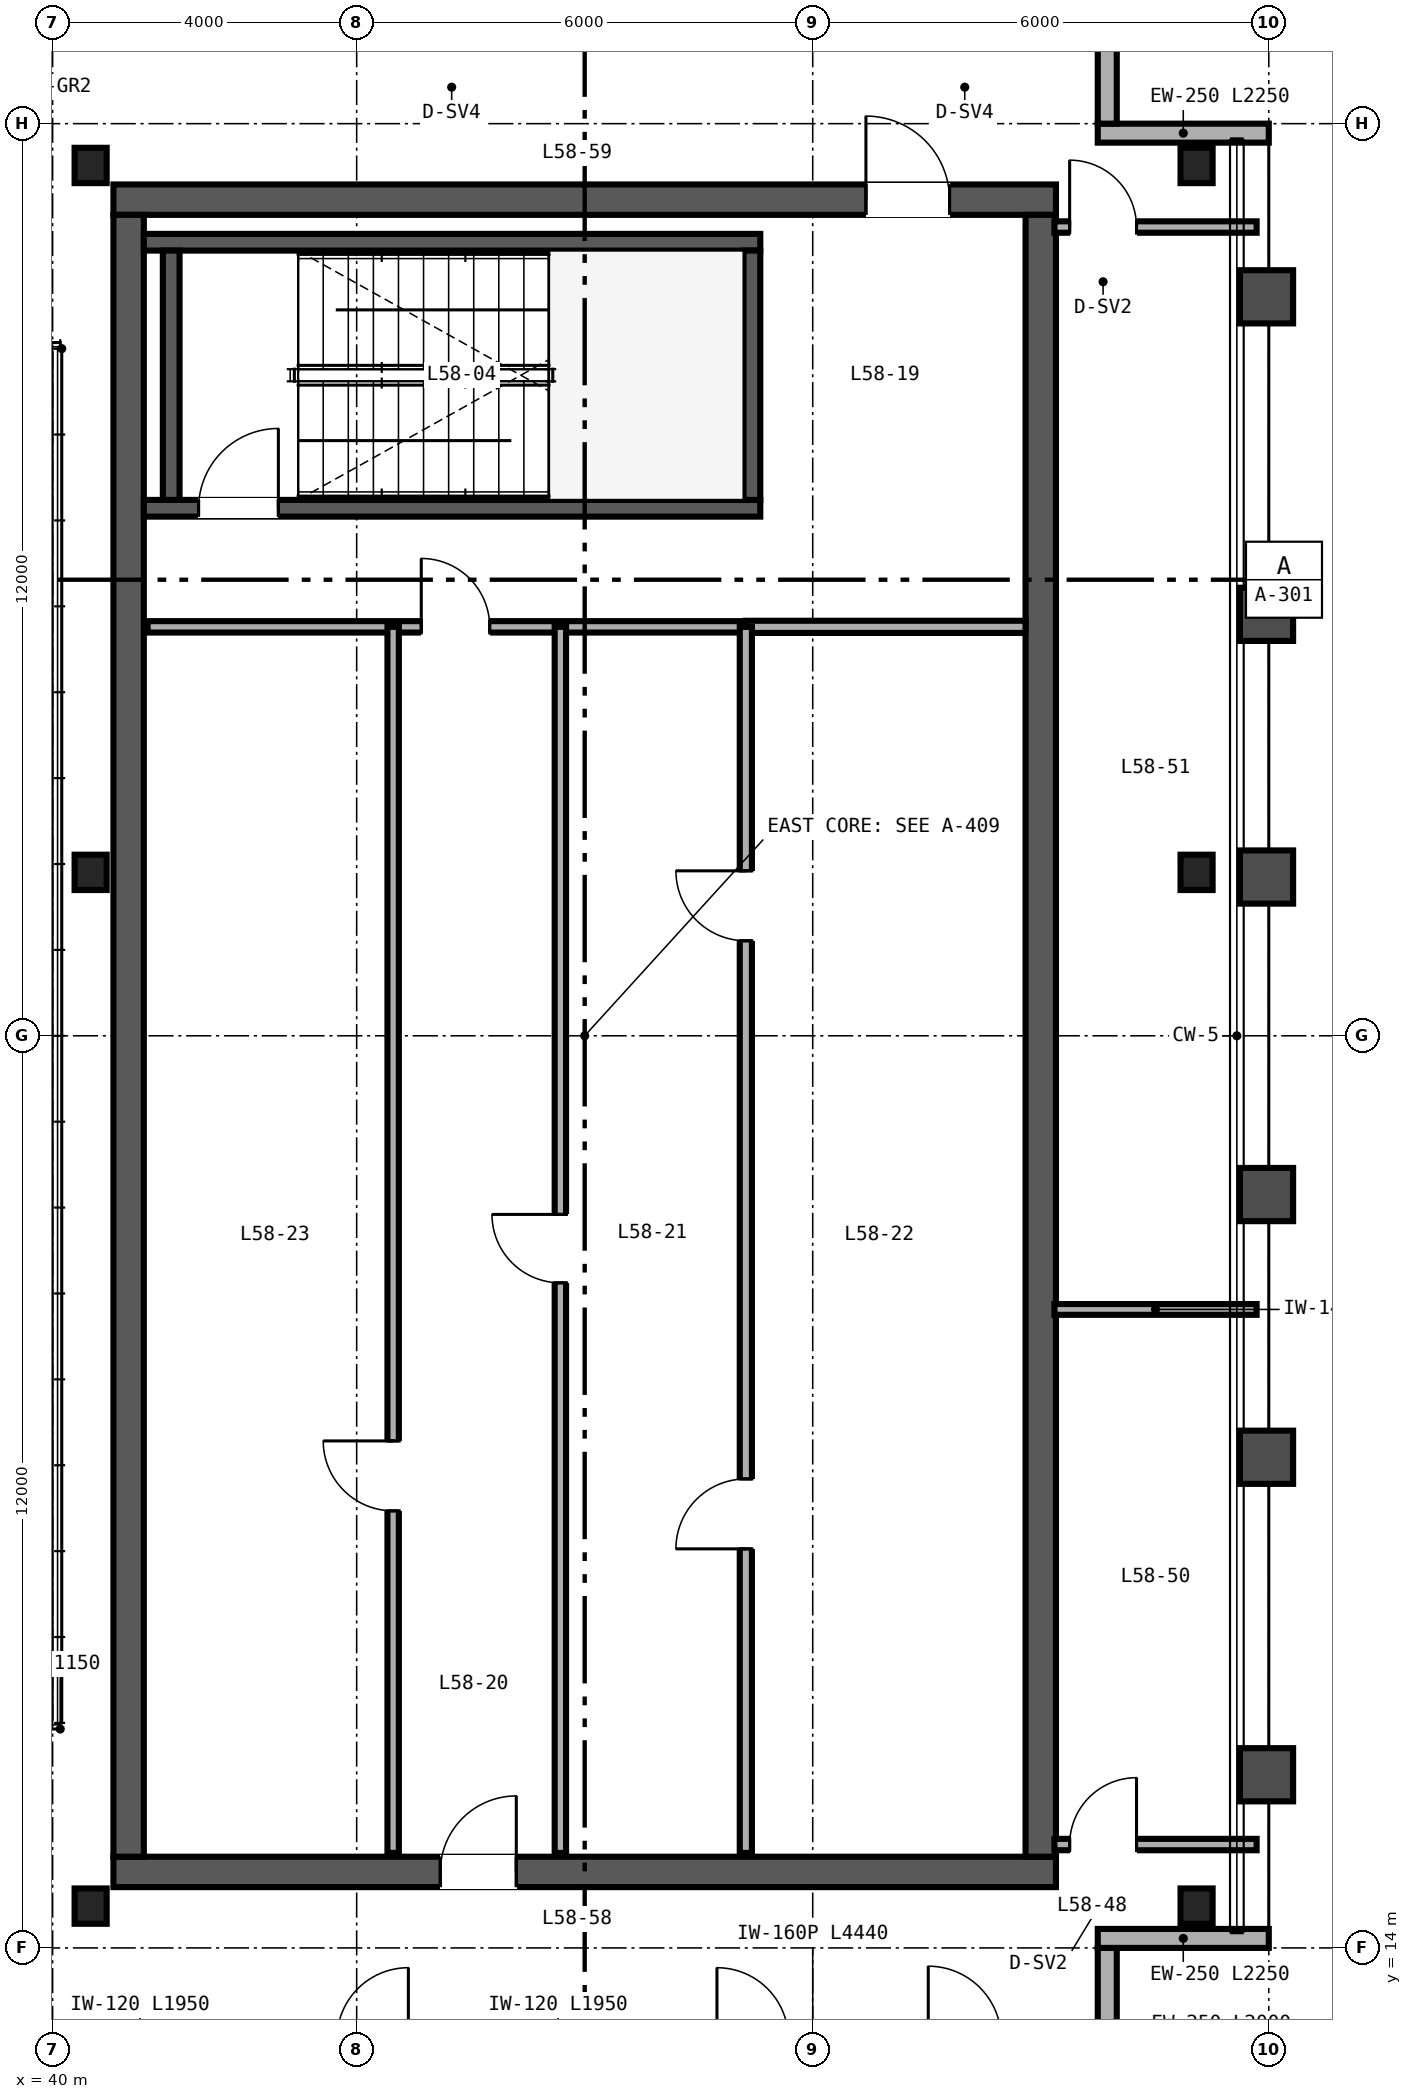
"""IFC4 building model, lengths in metres.
Left out: names, types, materials, properties, quantities, classifications, styles, units other than length and angle.
Written with IfcOpenShell. Run it as: python <this file> out.ifc"""

import sys

from ifc_helpers import new_model, si_unit, direction, frame, frame_2d, origin, origin_2d, place, context, subcontext, project, spatial, rectangle, i_section, extrude, source, transform, mapped, element, fill, save


model = new_model("IFC4")
c1 = context("Model", 3, precision=1e-05, world=origin(), true_north=direction((0.0, 1.0)))
c2 = subcontext(c1, "Body", "Model", "MODEL_VIEW")
j1 = project(units=[si_unit("LENGTHUNIT", "METRE"), si_unit("PLANEANGLEUNIT", "RADIAN")], contexts=[c1])
p1 = place(None, origin())
s1 = spatial("IfcSite", under=j1, at=p1, CompositionType="ELEMENT")
p2 = place(p1, origin())
s2 = spatial("IfcBuilding", under=s1, at=p2, CompositionType="ELEMENT")
p3 = place(p2, frame((0.0, 0.0, 232.8)))
s3 = spatial("IfcBuildingStorey", under=s2, at=p3, CompositionType="ELEMENT", Elevation=232.8)
p4 = place(p3, frame((40.8, 15.0, 0.0), z_axis=(0.0, 0.0, 1.0), x_axis=(1.0, 0.0, 0.0)))
e1 = element("IfcWall", 1, at=p4, inside=s3, PredefinedType="SHEAR", context=c2, shape_type="SweptSolid", body=[
    extrude(rectangle(XDim=12.4, YDim=0.4, at=frame_2d((6.2, 0.0))), origin(), (0.0, 0.0, 1.0), 3.38),
])
p5 = place(p4, frame((4.3, 0.0, 0.0)))
e2 = element("IfcOpeningElement", 2, at=p5, cuts=e1, PredefinedType="OPENING", context=c2, shape_type="SweptSolid", body=[
    extrude(rectangle(XDim=1.0, YDim=2.15, at=frame_2d((0.5, 1.075))), frame((0.0, 0.21, 0.0), z_axis=(0.0, -1.0, 0.0), x_axis=(1.0, 0.0, 0.0)), (0.0, 0.0, 1.0), 0.42),
])
p6 = place(p3, frame((40.8, 37.0, 0.0), z_axis=(0.0, 0.0, 1.0), x_axis=(1.0, 0.0, 0.0)))
e3 = element("IfcWall", 3, at=p6, inside=s3, PredefinedType="SHEAR", context=c2, shape_type="SweptSolid", body=[
    extrude(rectangle(XDim=12.4, YDim=0.4, at=frame_2d((6.2, 0.0))), origin(), (0.0, 0.0, 1.0), 3.38),
])
p7 = place(p6, frame((9.9, 0.0, 0.0)))
e4 = element("IfcOpeningElement", 4, at=p7, cuts=e3, PredefinedType="OPENING", context=c2, shape_type="SweptSolid", body=[
    extrude(rectangle(XDim=1.1, YDim=2.15, at=frame_2d((0.55, 1.075))), frame((0.0, 0.21, 0.0), z_axis=(0.0, -1.0, 0.0), x_axis=(1.0, 0.0, 0.0)), (0.0, 0.0, 1.0), 0.42),
])
for number, where, z_axis, x_axis in (
    (5, (41.0, 15.2, 0.0), (0.0, 0.0, 1.0), (0.0, 1.0, 0.0)),
    (6, (53.0, 15.2, 0.0), (0.0, 0.0, 1.0), (0.0, 1.0, 0.0)),
):
    element("IfcWall", number, at=place(p3, frame(where, z_axis=z_axis, x_axis=x_axis)), inside=s3, PredefinedType="SHEAR", context=c2, shape_type="SweptSolid", body=[
        extrude(rectangle(XDim=21.6, YDim=0.4, at=frame_2d((10.8, 0.0))), origin(), (0.0, 0.0, 1.0), 3.38),
    ])
p8 = place(p3, frame((41.2, 32.94, 0.0), z_axis=(0.0, 0.0, 1.0), x_axis=(1.0, 0.0, 0.0)))
e7 = element("IfcWall", 7, at=p8, inside=s3, PredefinedType="SHEAR", context=c2, shape_type="SweptSolid", body=[
    extrude(rectangle(XDim=8.11, YDim=0.22, at=frame_2d((4.055, 0.0))), origin(), (0.0, 0.0, 1.0), 3.4),
])
p9 = place(p8, frame((0.72, 0.0, 0.0)))
e8 = element("IfcOpeningElement", 8, at=p9, cuts=e7, PredefinedType="OPENING", context=c2, shape_type="SweptSolid", body=[
    extrude(rectangle(XDim=1.05, YDim=2.15, at=frame_2d((0.525, 1.075))), frame((0.0, 0.12, 0.0), z_axis=(0.0, -1.0, 0.0), x_axis=(1.0, 0.0, 0.0)), (0.0, 0.0, 1.0), 0.24),
])
p10 = place(p3, frame((41.2, 36.44, 0.0), z_axis=(0.0, 0.0, 1.0), x_axis=(1.0, 0.0, 0.0)))
e9 = element("IfcWall", 9, at=p10, inside=s3, PredefinedType="SHEAR", context=c2, shape_type="SweptSolid", body=[
    extrude(rectangle(XDim=8.11, YDim=0.22, at=frame_2d((4.055, 0.0))), origin(), (0.0, 0.0, 1.0), 3.4),
])
for number, where, z_axis, x_axis in (
    (10, (41.56, 33.05, 0.0), (0.0, 0.0, 1.0), (0.0, 1.0, 0.0)),
    (11, (49.2, 33.05, 0.0), (0.0, 0.0, 1.0), (0.0, 1.0, 0.0)),
):
    element("IfcWall", number, at=place(p3, frame(where, z_axis=z_axis, x_axis=x_axis)), inside=s3, PredefinedType="SHEAR", context=c2, shape_type="SweptSolid", body=[
        extrude(rectangle(XDim=3.28, YDim=0.22, at=frame_2d((1.64, 0.0))), origin(), (0.0, 0.0, 1.0), 3.4),
    ])
m1 = source(origin(), c2, "Body", "SweptSolid", [
    extrude(i_section(OverallWidth=0.422, OverallDepth=0.465, WebThickness=0.045, FlangeThickness=0.073, FilletRadius=0.025, at=origin_2d()), origin(), (0.0, 0.0, 1.0), 3.38),
])
for number, where, z_axis, x_axis in (
    (12, (40.5, 14.55, 0.0), (0.0, 0.0, 1.0), (1.0, 0.0, 0.0)),
    (13, (55.05, 14.55, 0.0), (0.0, 0.0, 1.0), (1.0, 0.0, 0.0)),
    (14, (40.5, 28.15, 0.0), (0.0, 0.0, 1.0), (1.0, 0.0, 0.0)),
    (15, (55.05, 28.15, 0.0), (0.0, 0.0, 1.0), (1.0, 0.0, 0.0)),
    (16, (40.5, 37.45, 0.0), (0.0, 0.0, 1.0), (1.0, 0.0, 0.0)),
    (17, (55.05, 37.45, 0.0), (0.0, 0.0, 1.0), (1.0, 0.0, 0.0)),
):
    element("IfcColumn", number, at=place(p3, frame(where, z_axis=z_axis, x_axis=x_axis)), inside=s3, PredefinedType="COLUMN", context=c2, shape_type="MappedRepresentation", body=[
        mapped(m1, transform((0.0, 0.0, 0.0), scale=1.0)),
    ])
p11 = place(p3, frame((53.875, 12.0, 0.0), z_axis=(0.0, 0.0, 1.0), x_axis=(0.0, 1.0, 0.0)))
e18 = element("IfcWall", 18, at=p11, inside=s3, PredefinedType="SOLIDWALL", context=c2, shape_type="SweptSolid", body=[
    extrude(rectangle(XDim=2.0, YDim=0.25, at=frame_2d((1.0, 0.0))), origin(), (0.0, 0.0, 1.0), 3.38),
])
for number, where, z_axis, x_axis in (
    (19, (53.75, 14.125, 0.0), (0.0, 0.0, 1.0), (1.0, 0.0, 0.0)),
    (20, (56.0, 37.875, 0.0), (0.0, 0.0, 1.0), (-1.0, 0.0, 0.0)),
):
    element("IfcWall", number, at=place(p3, frame(where, z_axis=z_axis, x_axis=x_axis)), inside=s3, PredefinedType="SOLIDWALL", context=c2, shape_type="SweptSolid", body=[
        extrude(rectangle(XDim=2.25, YDim=0.25, at=frame_2d((1.125, 0.0))), origin(), (0.0, 0.0, 1.0), 3.38),
    ])
p12 = place(p3, frame((53.875, 38.0, 0.0), z_axis=(0.0, 0.0, 1.0), x_axis=(0.0, 1.0, 0.0)))
e21 = element("IfcWall", 21, at=p12, inside=s3, PredefinedType="SOLIDWALL", context=c2, shape_type="SweptSolid", body=[
    extrude(rectangle(XDim=2.0, YDim=0.25, at=frame_2d((1.0, 0.0))), origin(), (0.0, 0.0, 1.0), 3.38),
])
p13 = place(p3, frame((41.25, 31.38, 0.0), z_axis=(0.0, 0.0, 1.0), x_axis=(1.0, 0.0, 0.0)))
e22 = element("IfcWall", 22, at=p13, inside=s3, PredefinedType="PARTITIONING", context=c2, shape_type="SweptSolid", body=[
    extrude(rectangle(XDim=7.87, YDim=0.15, at=frame_2d((3.935, 0.0))), origin(), (0.0, 0.0, 1.0), 2.48),
])
p14 = place(p13, frame((3.6, 0.0, 0.0)))
e23 = element("IfcOpeningElement", 23, at=p14, cuts=e22, PredefinedType="OPENING", context=c2, shape_type="SweptSolid", body=[
    extrude(rectangle(XDim=0.9, YDim=2.15, at=frame_2d((0.45, 1.075))), frame((0.0, 0.085, 0.0), z_axis=(0.0, -1.0, 0.0), x_axis=(1.0, 0.0, 0.0)), (0.0, 0.0, 1.0), 0.17),
])
p15 = place(p3, frame((46.68, 15.25, 0.0), z_axis=(0.0, 0.0, 1.0), x_axis=(0.0, 1.0, 0.0)))
e24 = element("IfcWall", 24, at=p15, inside=s3, PredefinedType="PARTITIONING", context=c2, shape_type="SweptSolid", body=[
    extrude(rectangle(XDim=16.13, YDim=0.15, at=frame_2d((8.065, 0.0))), origin(), (0.0, 0.0, 1.0), 2.453),
])
p16 = place(p15, frame((7.5, 0.0, 0.0)))
e25 = element("IfcOpeningElement", 25, at=p16, cuts=e24, PredefinedType="OPENING", context=c2, shape_type="SweptSolid", body=[
    extrude(rectangle(XDim=0.9, YDim=2.15, at=frame_2d((0.45, 1.075))), frame((0.0, 0.085, 0.0), z_axis=(0.0, -1.0, 0.0), x_axis=(1.0, 0.0, 0.0)), (0.0, 0.0, 1.0), 0.17),
])
p17 = place(p3, frame((49.12, 31.38, 0.0), z_axis=(0.0, 0.0, 1.0), x_axis=(1.0, 0.0, 0.0)))
e26 = element("IfcWall", 26, at=p17, inside=s3, PredefinedType="PARTITIONING", context=c2, shape_type="SweptSolid", body=[
    extrude(rectangle(XDim=3.68, YDim=0.16, at=frame_2d((1.84, 0.0))), origin(), (0.0, 0.0, 1.0), 2.48),
])
p18 = place(p3, frame((49.12, 15.25, 0.0), z_axis=(0.0, 0.0, 1.0), x_axis=(0.0, 1.0, 0.0)))
e27 = element("IfcWall", 27, at=p18, inside=s3, PredefinedType="PARTITIONING", context=c2, shape_type="SweptSolid", body=[
    extrude(rectangle(XDim=16.13, YDim=0.16, at=frame_2d((8.065, 0.0))), origin(), (0.0, 0.0, 1.0), 2.453),
])
p19 = place(p18, frame((4.0, 0.0, 0.0)))
e28 = element("IfcOpeningElement", 28, at=p19, cuts=e27, PredefinedType="OPENING", context=c2, shape_type="SweptSolid", body=[
    extrude(rectangle(XDim=0.92, YDim=2.15, at=frame_2d((0.46, 1.075))), frame((0.0, 0.09, 0.0), z_axis=(0.0, -1.0, 0.0), x_axis=(1.0, 0.0, 0.0)), (0.0, 0.0, 1.0), 0.18),
])
p20 = place(p18, frame((12.0, 0.0, 0.0)))
e29 = element("IfcOpeningElement", 29, at=p20, cuts=e27, PredefinedType="OPENING", context=c2, shape_type="SweptSolid", body=[
    extrude(rectangle(XDim=0.92, YDim=2.15, at=frame_2d((0.46, 1.075))), frame((0.0, 0.09, 0.0), z_axis=(0.0, -1.0, 0.0), x_axis=(1.0, 0.0, 0.0)), (0.0, 0.0, 1.0), 0.18),
])
p21 = place(p3, frame((44.48, 15.25, 0.0), z_axis=(0.0, 0.0, 1.0), x_axis=(0.0, 1.0, 0.0)))
e30 = element("IfcWall", 30, at=p21, inside=s3, PredefinedType="PARTITIONING", context=c2, shape_type="SweptSolid", body=[
    extrude(rectangle(XDim=16.13, YDim=0.15, at=frame_2d((8.065, 0.0))), origin(), (0.0, 0.0, 1.0), 2.453),
])
p22 = place(p21, frame((4.5, 0.0, 0.0)))
e31 = element("IfcOpeningElement", 31, at=p22, cuts=e30, PredefinedType="OPENING", context=c2, shape_type="SweptSolid", body=[
    extrude(rectangle(XDim=0.92, YDim=2.15, at=frame_2d((0.46, 1.075))), frame((0.0, 0.085, 0.0), z_axis=(0.0, -1.0, 0.0), x_axis=(1.0, 0.0, 0.0)), (0.0, 0.0, 1.0), 0.17),
])
p23 = place(p3, frame((53.18, 15.36, 0.0), z_axis=(0.0, 0.0, 1.0), x_axis=(1.0, 0.0, 0.0)))
e32 = element("IfcWall", 32, at=p23, inside=s3, PredefinedType="PARTITIONING", context=c2, shape_type="SweptSolid", body=[
    extrude(rectangle(XDim=2.66, YDim=0.15, at=frame_2d((1.33, 0.0))), origin(), (0.0, 0.0, 1.0), 2.601),
])
p24 = place(p23, frame((0.2, 0.0, 0.0)))
e33 = element("IfcOpeningElement", 33, at=p24, cuts=e32, PredefinedType="OPENING", context=c2, shape_type="SweptSolid", body=[
    extrude(rectangle(XDim=0.88, YDim=2.15, at=frame_2d((0.44, 1.075))), frame((0.0, 0.085, 0.0), z_axis=(0.0, -1.0, 0.0), x_axis=(1.0, 0.0, 0.0)), (0.0, 0.0, 1.0), 0.17),
])
p25 = place(p3, frame((53.18, 36.64, 0.0), z_axis=(0.0, 0.0, 1.0), x_axis=(1.0, 0.0, 0.0)))
e34 = element("IfcWall", 34, at=p25, inside=s3, PredefinedType="PARTITIONING", context=c2, shape_type="SweptSolid", body=[
    extrude(rectangle(XDim=2.66, YDim=0.15, at=frame_2d((1.33, 0.0))), origin(), (0.0, 0.0, 1.0), 2.763),
])
p26 = place(p25, frame((0.2, 0.0, 0.0)))
e35 = element("IfcOpeningElement", 35, at=p26, cuts=e34, PredefinedType="OPENING", context=c2, shape_type="SweptSolid", body=[
    extrude(rectangle(XDim=0.88, YDim=2.15, at=frame_2d((0.44, 1.075))), frame((0.0, 0.085, 0.0), z_axis=(0.0, -1.0, 0.0), x_axis=(1.0, 0.0, 0.0)), (0.0, 0.0, 1.0), 0.17),
])
p27 = place(p3, frame((53.18, 22.4, 0.0), z_axis=(0.0, 0.0, 1.0), x_axis=(1.0, 0.0, 0.0)))
e36 = element("IfcWall", 36, at=p27, inside=s3, PredefinedType="PARTITIONING", context=c2, shape_type="SweptSolid", body=[
    extrude(rectangle(XDim=2.66, YDim=0.142, at=frame_2d((1.33, 0.0))), origin(), (0.0, 0.0, 1.0), 2.601),
])
m2 = source(origin(), c2, "Body", "SweptSolid", [
    extrude(rectangle(XDim=1.05, YDim=2.15, at=frame_2d((0.525, 1.075))), frame((0.0, 0.025, 0.0), z_axis=(0.0, -1.0, 0.0), x_axis=(1.0, 0.0, 0.0)), (0.0, 0.0, 1.0), 0.05),
])
p28 = place(p9, origin())
e37 = element("IfcDoor", 37, at=p28, inside=s3, OperationType="SINGLE_SWING_RIGHT", PredefinedType="DOOR", context=c2, shape_type="MappedRepresentation", body=[
    mapped(m2, transform((0.0, 0.0, 0.0), scale=1.0)),
])
fill(e8, e37)
m3 = source(origin(), c2, "Body", "SweptSolid", [
    extrude(rectangle(XDim=0.9, YDim=2.15, at=frame_2d((0.45, 1.075))), frame((0.0, 0.025, 0.0), z_axis=(0.0, -1.0, 0.0), x_axis=(1.0, 0.0, 0.0)), (0.0, 0.0, 1.0), 0.05),
])
p29 = place(p16, origin())
e38 = element("IfcDoor", 38, at=p29, inside=s3, OperationType="SINGLE_SWING_RIGHT", PredefinedType="DOOR", context=c2, shape_type="MappedRepresentation", body=[
    mapped(m3, transform((0.0, 0.0, 0.0), scale=1.0)),
])
fill(e25, e38)
p30 = place(p14, origin())
e39 = element("IfcDoor", 39, at=p30, inside=s3, OperationType="SINGLE_SWING_LEFT", PredefinedType="DOOR", context=c2, shape_type="MappedRepresentation", body=[
    mapped(m3, transform((0.0, 0.0, 0.0), scale=1.0)),
])
fill(e23, e39)
m4 = source(origin(), c2, "Body", "SweptSolid", [
    extrude(rectangle(XDim=1.0, YDim=2.15, at=frame_2d((0.5, 1.075))), frame((0.0, 0.025, 0.0), z_axis=(0.0, -1.0, 0.0), x_axis=(1.0, 0.0, 0.0)), (0.0, 0.0, 1.0), 0.05),
])
p31 = place(p5, origin())
e40 = element("IfcDoor", 40, at=p31, inside=s3, OperationType="SINGLE_SWING_RIGHT", PredefinedType="DOOR", context=c2, shape_type="MappedRepresentation", body=[
    mapped(m4, transform((0.0, 0.0, 0.0), scale=1.0)),
])
fill(e2, e40)
m5 = source(origin(), c2, "Body", "SweptSolid", [
    extrude(rectangle(XDim=1.1, YDim=2.15, at=frame_2d((0.55, 1.075))), frame((0.0, 0.025, 0.0), z_axis=(0.0, -1.0, 0.0), x_axis=(1.0, 0.0, 0.0)), (0.0, 0.0, 1.0), 0.05),
])
p32 = place(p7, origin())
e41 = element("IfcDoor", 41, at=p32, inside=s3, OperationType="SINGLE_SWING_LEFT", PredefinedType="DOOR", context=c2, shape_type="MappedRepresentation", body=[
    mapped(m5, transform((0.0, 0.0, 0.0), scale=1.0)),
])
fill(e4, e41)
m6 = source(origin(), c2, "Body", "SweptSolid", [
    extrude(rectangle(XDim=0.92, YDim=2.15, at=frame_2d((0.46, 1.075))), frame((0.0, 0.025, 0.0), z_axis=(0.0, -1.0, 0.0), x_axis=(1.0, 0.0, 0.0)), (0.0, 0.0, 1.0), 0.05),
])
p33 = place(p19, origin())
e42 = element("IfcDoor", 42, at=p33, inside=s3, OperationType="SINGLE_SWING_LEFT", PredefinedType="DOOR", context=c2, shape_type="MappedRepresentation", body=[
    mapped(m6, transform((0.0, 0.0, 0.0), scale=1.0)),
])
fill(e28, e42)
p34 = place(p20, origin())
e43 = element("IfcDoor", 43, at=p34, inside=s3, OperationType="SINGLE_SWING_RIGHT", PredefinedType="DOOR", context=c2, shape_type="MappedRepresentation", body=[
    mapped(m6, transform((0.0, 0.0, 0.0), scale=1.0)),
])
fill(e29, e43)
p35 = place(p22, origin())
e44 = element("IfcDoor", 44, at=p35, inside=s3, OperationType="SINGLE_SWING_RIGHT", PredefinedType="DOOR", context=c2, shape_type="MappedRepresentation", body=[
    mapped(m6, transform((0.0, 0.0, 0.0), scale=1.0)),
])
fill(e31, e44)
m7 = source(origin(), c2, "Body", "SweptSolid", [
    extrude(rectangle(XDim=0.88, YDim=2.15, at=frame_2d((0.44, 1.075))), frame((0.0, 0.025, 0.0), z_axis=(0.0, -1.0, 0.0), x_axis=(1.0, 0.0, 0.0)), (0.0, 0.0, 1.0), 0.05),
])
p36 = place(p24, origin())
e45 = element("IfcDoor", 45, at=p36, inside=s3, OperationType="SINGLE_SWING_RIGHT", PredefinedType="DOOR", context=c2, shape_type="MappedRepresentation", body=[
    mapped(m7, transform((0.0, 0.0, 0.0), scale=1.0)),
])
fill(e33, e45)
p37 = place(p26, origin())
e46 = element("IfcDoor", 46, at=p37, inside=s3, OperationType="SINGLE_SWING_LEFT", PredefinedType="DOOR", context=c2, shape_type="MappedRepresentation", body=[
    mapped(m7, transform((0.0, 0.0, 0.0), scale=1.0)),
])
fill(e35, e46)
save(model, sys.argv[1])
